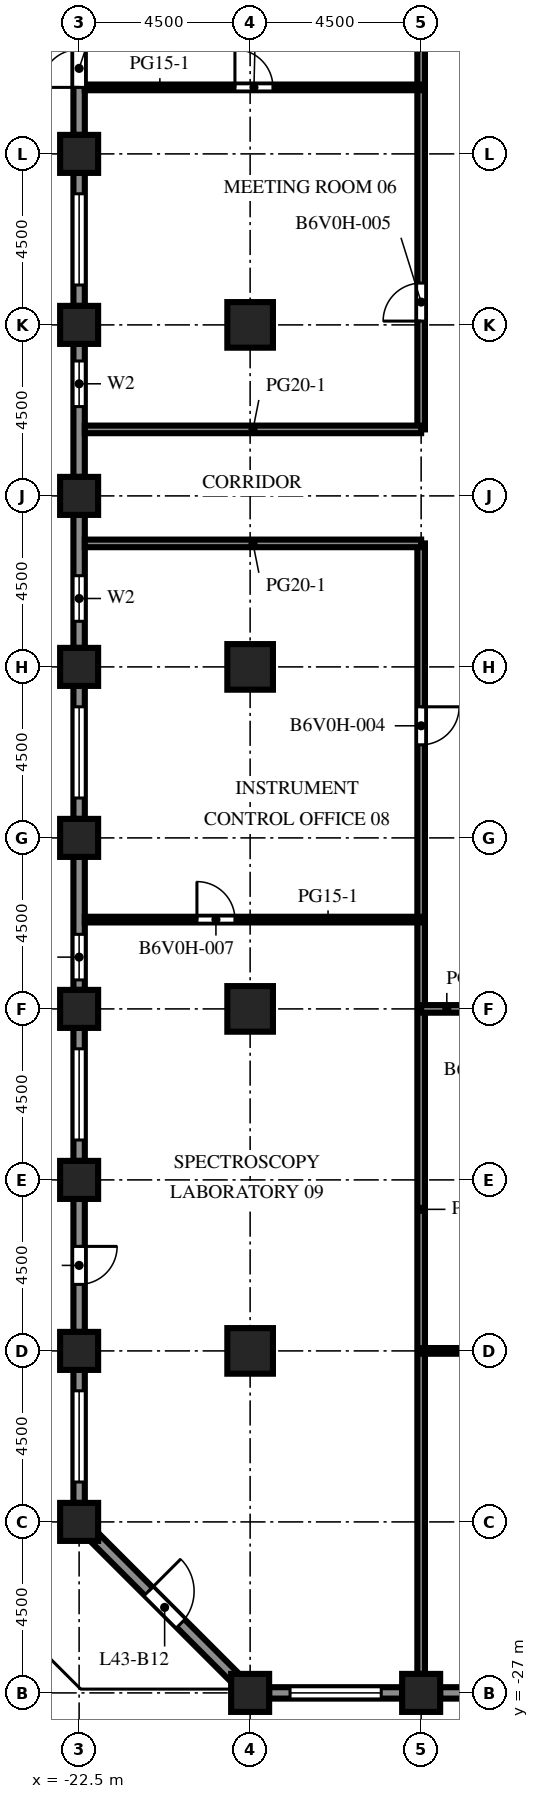
"""IFC4 building model, lengths in metres.
Left out: names, types, materials, properties, quantities, classifications, styles, units other than length and angle.
Written with IfcOpenShell. Run it as: python <this file> out.ifc"""

import sys

from ifc_helpers import new_model, si_unit, direction, frame, frame_2d, origin, origin_2d, place, context, subcontext, project, spatial, rectangle, extrude, element, fill, save


model = new_model("IFC4")
c1 = context("Model", 3, precision=1e-05, world=origin(), true_north=direction((0.0, 1.0)))
c2 = subcontext(c1, "Body", "Model", "MODEL_VIEW")
j1 = project(units=[si_unit("LENGTHUNIT", "METRE"), si_unit("PLANEANGLEUNIT", "RADIAN")], contexts=[c1])
p1 = place(None, origin())
s1 = spatial("IfcSite", under=j1, at=p1, CompositionType="ELEMENT")
p2 = place(p1, origin())
s2 = spatial("IfcBuilding", under=s1, at=p2, CompositionType="ELEMENT")
p3 = place(p2, frame((0.0, 0.0, 191.5)))
s3 = spatial("IfcBuildingStorey", under=s2, at=p3, CompositionType="ELEMENT", Elevation=191.5)
for number, where, z_axis, x_axis in (
    (1, (-22.5, -22.5, -0.45), (0.0, 0.0, 1.0), (1.0, 0.0, 0.0)),
    (2, (-22.5, -18.0, -0.45), (0.0, 0.0, 1.0), (1.0, 0.0, 0.0)),
    (3, (-22.5, -13.5, -0.45), (0.0, 0.0, 1.0), (1.0, 0.0, 0.0)),
    (4, (-22.5, -9.0, -0.45), (0.0, 0.0, 1.0), (1.0, 0.0, 0.0)),
    (5, (-22.5, -4.5, -0.45), (0.0, 0.0, 1.0), (1.0, 0.0, 0.0)),
    (6, (-22.5, 0.0, -0.45), (0.0, 0.0, 1.0), (1.0, 0.0, 0.0)),
    (7, (-22.5, 4.5, -0.45), (0.0, 0.0, 1.0), (1.0, 0.0, 0.0)),
    (8, (-22.5, 9.0, -0.45), (0.0, 0.0, 1.0), (1.0, 0.0, 0.0)),
    (9, (-22.5, 13.5, -0.45), (0.0, 0.0, 1.0), (1.0, 0.0, 0.0)),
):
    element("IfcColumn", number, at=place(p3, frame(where, z_axis=z_axis, x_axis=x_axis)), inside=s3, PredefinedType="COLUMN", context=c2, shape_type="SweptSolid", body=[
        extrude(rectangle(XDim=1.0, YDim=1.0, at=origin_2d()), origin(), (0.0, 0.0, 1.0), 4.55),
    ])
for number, where, z_axis, x_axis in (
    (10, (-18.0, -27.0, 0.0), (0.0, 0.0, 1.0), (1.0, 0.0, 0.0)),
    (11, (-13.5, -27.0, 0.0), (0.0, 0.0, 1.0), (1.0, 0.0, 0.0)),
):
    element("IfcColumn", number, at=place(p3, frame(where, z_axis=z_axis, x_axis=x_axis)), inside=s3, PredefinedType="COLUMN", context=c2, shape_type="SweptSolid", body=[
        extrude(rectangle(XDim=1.0, YDim=1.0, at=origin_2d()), origin(), (0.0, 0.0, 1.0), 4.1),
    ])
for number, where, z_axis, x_axis in (
    (12, (-18.0, -18.0, -0.45), (0.0, 0.0, 1.0), (1.0, 0.0, 0.0)),
    (13, (-18.0, -9.0, -0.45), (0.0, 0.0, 1.0), (1.0, 0.0, 0.0)),
    (14, (-18.0, 0.0, -0.45), (0.0, 0.0, 1.0), (1.0, 0.0, 0.0)),
    (15, (-18.0, 9.0, -0.45), (0.0, 0.0, 1.0), (1.0, 0.0, 0.0)),
):
    element("IfcColumn", number, at=place(p3, frame(where, z_axis=z_axis, x_axis=x_axis)), inside=s3, PredefinedType="COLUMN", context=c2, shape_type="SweptSolid", body=[
        extrude(rectangle(XDim=1.2, YDim=1.2, at=origin_2d()), origin(), (0.0, 0.0, 1.0), 4.55),
    ])
p4 = place(p3, frame((-14.0, -27.0, 0.0), z_axis=(0.0, 0.0, 1.0), x_axis=(-1.0, 0.0, 0.0)))
e16 = element("IfcWall", 16, at=p4, inside=s3, PredefinedType="SOLIDWALL", context=c2, shape_type="SweptSolid", body=[
    extrude(rectangle(XDim=3.5, YDim=0.3, at=frame_2d((1.75, 0.0))), origin(), (0.0, 0.0, 1.0), 2.85),
])
p5 = place(p4, frame((0.55, 0.0, 0.8)))
e17 = element("IfcOpeningElement", 17, at=p5, cuts=e16, PredefinedType="OPENING", context=c2, shape_type="SweptSolid", body=[
    extrude(rectangle(XDim=2.4, YDim=1.7, at=frame_2d((1.2, 0.85))), frame((0.0, 0.16, 0.0), z_axis=(0.0, -1.0, 0.0), x_axis=(1.0, 0.0, 0.0)), (0.0, 0.0, 1.0), 0.32),
])
p6 = place(p3, frame((-9.5, -27.0, 0.0), z_axis=(0.0, 0.0, 1.0), x_axis=(-1.0, 0.0, 0.0)))
e18 = element("IfcWall", 18, at=p6, inside=s3, PredefinedType="SOLIDWALL", context=c2, shape_type="SweptSolid", body=[
    extrude(rectangle(XDim=3.5, YDim=0.3, at=frame_2d((1.75, 0.0))), origin(), (0.0, 0.0, 1.0), 2.85),
])
p7 = place(p6, frame((1.25, 0.0, 0.0)))
e19 = element("IfcOpeningElement", 19, at=p7, cuts=e18, PredefinedType="OPENING", context=c2, shape_type="SweptSolid", body=[
    extrude(rectangle(XDim=1.0, YDim=2.2, at=frame_2d((0.5, 1.1))), frame((0.0, 0.16, 0.0), z_axis=(0.0, -1.0, 0.0), x_axis=(1.0, 0.0, 0.0)), (0.0, 0.0, 1.0), 0.32),
])
p8 = place(p3, frame((-22.5, 14.0, 0.0), z_axis=(0.0, 0.0, 1.0), x_axis=(0.0, 1.0, 0.0)))
e20 = element("IfcWall", 20, at=p8, inside=s3, PredefinedType="SOLIDWALL", context=c2, shape_type="SweptSolid", body=[
    extrude(rectangle(XDim=3.5, YDim=0.3, at=frame_2d((1.75, 0.0))), origin(), (0.0, 0.0, 1.0), 2.85),
])
p9 = place(p8, frame((1.25, 0.0, 0.0)))
e21 = element("IfcOpeningElement", 21, at=p9, cuts=e20, PredefinedType="OPENING", context=c2, shape_type="SweptSolid", body=[
    extrude(rectangle(XDim=1.0, YDim=2.2, at=frame_2d((0.5, 1.1))), frame((0.0, 0.16, 0.0), z_axis=(0.0, -1.0, 0.0), x_axis=(1.0, 0.0, 0.0)), (0.0, 0.0, 1.0), 0.32),
])
p10 = place(p3, frame((-22.5, 9.5, 0.0), z_axis=(0.0, 0.0, 1.0), x_axis=(0.0, 1.0, 0.0)))
e22 = element("IfcWall", 22, at=p10, inside=s3, PredefinedType="SOLIDWALL", context=c2, shape_type="SweptSolid", body=[
    extrude(rectangle(XDim=3.5, YDim=0.3, at=frame_2d((1.75, 0.0))), origin(), (0.0, 0.0, 1.0), 2.85),
])
p11 = place(p10, frame((0.55, 0.0, 0.8)))
e23 = element("IfcOpeningElement", 23, at=p11, cuts=e22, PredefinedType="OPENING", context=c2, shape_type="SweptSolid", body=[
    extrude(rectangle(XDim=2.4, YDim=1.7, at=frame_2d((1.2, 0.85))), frame((0.0, 0.16, 0.0), z_axis=(0.0, -1.0, 0.0), x_axis=(1.0, 0.0, 0.0)), (0.0, 0.0, 1.0), 0.32),
])
p12 = place(p3, frame((-22.5, 5.0, 0.0), z_axis=(0.0, 0.0, 1.0), x_axis=(0.0, 1.0, 0.0)))
e24 = element("IfcWall", 24, at=p12, inside=s3, PredefinedType="SOLIDWALL", context=c2, shape_type="SweptSolid", body=[
    extrude(rectangle(XDim=3.5, YDim=0.3, at=frame_2d((1.75, 0.0))), origin(), (0.0, 0.0, 1.0), 2.85),
])
p13 = place(p12, frame((1.85, 0.0, 0.8)))
e25 = element("IfcOpeningElement", 25, at=p13, cuts=e24, PredefinedType="OPENING", context=c2, shape_type="SweptSolid", body=[
    extrude(rectangle(XDim=1.2, YDim=1.7, at=frame_2d((0.6, 0.85))), frame((0.0, 0.16, 0.0), z_axis=(0.0, -1.0, 0.0), x_axis=(1.0, 0.0, 0.0)), (0.0, 0.0, 1.0), 0.32),
])
p14 = place(p3, frame((-22.5, 0.5, 0.0), z_axis=(0.0, 0.0, 1.0), x_axis=(0.0, 1.0, 0.0)))
e26 = element("IfcWall", 26, at=p14, inside=s3, PredefinedType="SOLIDWALL", context=c2, shape_type="SweptSolid", body=[
    extrude(rectangle(XDim=3.5, YDim=0.3, at=frame_2d((1.75, 0.0))), origin(), (0.0, 0.0, 1.0), 2.85),
])
p15 = place(p14, frame((0.7, 0.0, 0.8)))
e27 = element("IfcOpeningElement", 27, at=p15, cuts=e26, PredefinedType="OPENING", context=c2, shape_type="SweptSolid", body=[
    extrude(rectangle(XDim=1.2, YDim=1.7, at=frame_2d((0.6, 0.85))), frame((0.0, 0.16, 0.0), z_axis=(0.0, -1.0, 0.0), x_axis=(1.0, 0.0, 0.0)), (0.0, 0.0, 1.0), 0.32),
])
p16 = place(p3, frame((-22.5, -4.0, 0.0), z_axis=(0.0, 0.0, 1.0), x_axis=(0.0, 1.0, 0.0)))
e28 = element("IfcWall", 28, at=p16, inside=s3, PredefinedType="SOLIDWALL", context=c2, shape_type="SweptSolid", body=[
    extrude(rectangle(XDim=3.5, YDim=0.3, at=frame_2d((1.75, 0.0))), origin(), (0.0, 0.0, 1.0), 2.85),
])
p17 = place(p16, frame((0.55, 0.0, 0.8)))
e29 = element("IfcOpeningElement", 29, at=p17, cuts=e28, PredefinedType="OPENING", context=c2, shape_type="SweptSolid", body=[
    extrude(rectangle(XDim=2.4, YDim=1.7, at=frame_2d((1.2, 0.85))), frame((0.0, 0.16, 0.0), z_axis=(0.0, -1.0, 0.0), x_axis=(1.0, 0.0, 0.0)), (0.0, 0.0, 1.0), 0.32),
])
p18 = place(p3, frame((-22.5, -8.5, 0.0), z_axis=(0.0, 0.0, 1.0), x_axis=(0.0, 1.0, 0.0)))
e30 = element("IfcWall", 30, at=p18, inside=s3, PredefinedType="SOLIDWALL", context=c2, shape_type="SweptSolid", body=[
    extrude(rectangle(XDim=3.5, YDim=0.3, at=frame_2d((1.75, 0.0))), origin(), (0.0, 0.0, 1.0), 2.85),
])
p19 = place(p18, frame((0.262, 0.0, 0.8)))
e31 = element("IfcOpeningElement", 31, at=p19, cuts=e30, PredefinedType="OPENING", context=c2, shape_type="SweptSolid", body=[
    extrude(rectangle(XDim=1.2, YDim=1.7, at=frame_2d((0.6, 0.85))), frame((0.0, 0.16, 0.0), z_axis=(0.0, -1.0, 0.0), x_axis=(1.0, 0.0, 0.0)), (0.0, 0.0, 1.0), 0.32),
])
p20 = place(p3, frame((-22.5, -13.0, 0.0), z_axis=(0.0, 0.0, 1.0), x_axis=(0.0, 1.0, 0.0)))
e32 = element("IfcWall", 32, at=p20, inside=s3, PredefinedType="SOLIDWALL", context=c2, shape_type="SweptSolid", body=[
    extrude(rectangle(XDim=3.5, YDim=0.3, at=frame_2d((1.75, 0.0))), origin(), (0.0, 0.0, 1.0), 2.85),
])
p21 = place(p20, frame((0.55, 0.0, 0.8)))
e33 = element("IfcOpeningElement", 33, at=p21, cuts=e32, PredefinedType="OPENING", context=c2, shape_type="SweptSolid", body=[
    extrude(rectangle(XDim=2.4, YDim=1.7, at=frame_2d((1.2, 0.85))), frame((0.0, 0.16, 0.0), z_axis=(0.0, -1.0, 0.0), x_axis=(1.0, 0.0, 0.0)), (0.0, 0.0, 1.0), 0.32),
])
p22 = place(p3, frame((-22.5, -17.5, 0.0), z_axis=(0.0, 0.0, 1.0), x_axis=(0.0, 1.0, 0.0)))
e34 = element("IfcWall", 34, at=p22, inside=s3, PredefinedType="SOLIDWALL", context=c2, shape_type="SweptSolid", body=[
    extrude(rectangle(XDim=3.5, YDim=0.3, at=frame_2d((1.75, 0.0))), origin(), (0.0, 0.0, 1.0), 2.85),
])
p23 = place(p22, frame((1.25, 0.0, 0.0)))
e35 = element("IfcOpeningElement", 35, at=p23, cuts=e34, PredefinedType="OPENING", context=c2, shape_type="SweptSolid", body=[
    extrude(rectangle(XDim=1.0, YDim=2.2, at=frame_2d((0.5, 1.1))), frame((0.0, 0.16, 0.0), z_axis=(0.0, -1.0, 0.0), x_axis=(1.0, 0.0, 0.0)), (0.0, 0.0, 1.0), 0.32),
])
p24 = place(p3, frame((-22.5, -22.0, 0.0), z_axis=(0.0, 0.0, 1.0), x_axis=(0.0, 1.0, 0.0)))
e36 = element("IfcWall", 36, at=p24, inside=s3, PredefinedType="SOLIDWALL", context=c2, shape_type="SweptSolid", body=[
    extrude(rectangle(XDim=3.5, YDim=0.3, at=frame_2d((1.75, 0.0))), origin(), (0.0, 0.0, 1.0), 2.85),
])
p25 = place(p24, frame((0.55, 0.0, 0.8)))
e37 = element("IfcOpeningElement", 37, at=p25, cuts=e36, PredefinedType="OPENING", context=c2, shape_type="SweptSolid", body=[
    extrude(rectangle(XDim=2.4, YDim=1.7, at=frame_2d((1.2, 0.85))), frame((0.0, 0.16, 0.0), z_axis=(0.0, -1.0, 0.0), x_axis=(1.0, 0.0, 0.0)), (0.0, 0.0, 1.0), 0.32),
])
p26 = place(p3, frame((-18.394, -26.606, 0.0), z_axis=(0.0, 0.0, 1.0), x_axis=(-0.707106781187, 0.707106781187, 0.0)))
e38 = element("IfcWall", 38, at=p26, inside=s3, PredefinedType="SOLIDWALL", context=c2, shape_type="SweptSolid", body=[
    extrude(rectangle(XDim=5.25, YDim=0.3, at=frame_2d((2.625, 0.0))), origin(), (0.0, 0.0, 1.0), 2.85),
])
p27 = place(p26, frame((2.025, 0.0, 0.0)))
e39 = element("IfcOpeningElement", 39, at=p27, cuts=e38, PredefinedType="OPENING", context=c2, shape_type="SweptSolid", body=[
    extrude(rectangle(XDim=1.2, YDim=2.2, at=frame_2d((0.6, 1.1))), frame((0.0, 0.16, 0.0), z_axis=(0.0, -1.0, 0.0), x_axis=(1.0, 0.0, 0.0)), (0.0, 0.0, 1.0), 0.32),
])
p28 = place(p3, frame((-13.5, -26.5, 0.0), z_axis=(0.0, 0.0, 1.0), x_axis=(0.0, 1.0, 0.0)))
e40 = element("IfcWall", 40, at=p28, inside=s3, PredefinedType="PARTITIONING", context=c2, shape_type="SweptSolid", body=[
    extrude(rectangle(XDim=29.75, YDim=0.2, at=frame_2d((14.875, 0.0))), origin(), (0.0, 0.0, 1.0), 3.65),
])
p29 = place(p28, frame((24.45, 0.0, 0.0)))
e41 = element("IfcOpeningElement", 41, at=p29, cuts=e40, PredefinedType="OPENING", context=c2, shape_type="SweptSolid", body=[
    extrude(rectangle(XDim=1.0, YDim=2.1, at=frame_2d((0.5, 1.05))), frame((0.0, 0.11, 0.0), z_axis=(0.0, -1.0, 0.0), x_axis=(1.0, 0.0, 0.0)), (0.0, 0.0, 1.0), 0.22),
])
p30 = place(p3, frame((-13.5, 6.25, 0.0), z_axis=(0.0, 0.0, 1.0), x_axis=(0.0, 1.0, 0.0)))
e42 = element("IfcWall", 42, at=p30, inside=s3, PredefinedType="PARTITIONING", context=c2, shape_type="SweptSolid", body=[
    extrude(rectangle(XDim=20.25, YDim=0.2, at=frame_2d((10.125, 0.0))), origin(), (0.0, 0.0, 1.0), 3.65),
])
p31 = place(p30, frame((2.85, 0.0, 0.0)))
e43 = element("IfcOpeningElement", 43, at=p31, cuts=e42, PredefinedType="OPENING", context=c2, shape_type="SweptSolid", body=[
    extrude(rectangle(XDim=1.0, YDim=2.1, at=frame_2d((0.5, 1.05))), frame((0.0, 0.11, 0.0), z_axis=(0.0, -1.0, 0.0), x_axis=(1.0, 0.0, 0.0)), (0.0, 0.0, 1.0), 0.22),
])
p32 = place(p3, frame((-13.5, -18.0, 0.0), z_axis=(0.0, 0.0, 1.0), x_axis=(1.0, 0.0, 0.0)))
e44 = element("IfcWall", 44, at=p32, inside=s3, PredefinedType="PARTITIONING", context=c2, shape_type="SweptSolid", body=[
    extrude(rectangle(XDim=3.9, YDim=0.15, at=frame_2d((1.95, 0.0))), origin(), (0.0, 0.0, 1.0), 3.65),
])
p33 = place(p3, frame((-10.5, -9.0, 0.0), z_axis=(0.0, 0.0, 1.0), x_axis=(-1.0, 0.0, 0.0)))
e45 = element("IfcWall", 45, at=p33, inside=s3, PredefinedType="PARTITIONING", context=c2, shape_type="SweptSolid", body=[
    extrude(rectangle(XDim=3.0, YDim=0.2, at=frame_2d((1.5, 0.0))), origin(), (0.0, 0.0, 1.0), 3.65),
])
p34 = place(p33, frame((0.65, 0.0, 0.0)))
e46 = element("IfcOpeningElement", 46, at=p34, cuts=e45, PredefinedType="OPENING", context=c2, shape_type="SweptSolid", body=[
    extrude(rectangle(XDim=1.0, YDim=2.1, at=frame_2d((0.5, 1.05))), frame((0.0, 0.11, 0.0), z_axis=(0.0, -1.0, 0.0), x_axis=(1.0, 0.0, 0.0)), (0.0, 0.0, 1.0), 0.22),
])
p35 = place(p3, frame((-13.5, -6.65, 0.0), z_axis=(0.0, 0.0, 1.0), x_axis=(-1.0, 0.0, 0.0)))
e47 = element("IfcWall", 47, at=p35, inside=s3, PredefinedType="PARTITIONING", context=c2, shape_type="SweptSolid", body=[
    extrude(rectangle(XDim=8.85, YDim=0.15, at=frame_2d((4.425, 0.0))), origin(), (0.0, 0.0, 1.0), 3.65),
])
p36 = place(p35, frame((4.9, 0.0, 0.0)))
e48 = element("IfcOpeningElement", 48, at=p36, cuts=e47, PredefinedType="OPENING", context=c2, shape_type="SweptSolid", body=[
    extrude(rectangle(XDim=1.0, YDim=2.1, at=frame_2d((0.5, 1.05))), frame((0.0, 0.085, 0.0), z_axis=(0.0, -1.0, 0.0), x_axis=(1.0, 0.0, 0.0)), (0.0, 0.0, 1.0), 0.17),
])
for number, where, z_axis, x_axis in (
    (49, (-22.35, 3.25, 0.0), (0.0, 0.0, 1.0), (1.0, 0.0, 0.0)),
    (50, (-22.35, 6.25, 0.0), (0.0, 0.0, 1.0), (1.0, 0.0, 0.0)),
):
    element("IfcWall", number, at=place(p3, frame(where, z_axis=z_axis, x_axis=x_axis)), inside=s3, PredefinedType="PARTITIONING", context=c2, shape_type="SweptSolid", body=[
        extrude(rectangle(XDim=8.85, YDim=0.2, at=frame_2d((4.425, 0.0))), origin(), (0.0, 0.0, 1.0), 3.65),
    ])
p37 = place(p3, frame((-22.35, 15.25, 0.0), z_axis=(0.0, 0.0, 1.0), x_axis=(1.0, 0.0, 0.0)))
e51 = element("IfcWall", 51, at=p37, inside=s3, PredefinedType="PARTITIONING", context=c2, shape_type="SweptSolid", body=[
    extrude(rectangle(XDim=8.85, YDim=0.15, at=frame_2d((4.425, 0.0))), origin(), (0.0, 0.0, 1.0), 3.65),
])
p38 = place(p37, frame((3.95, 0.0, 0.0)))
e52 = element("IfcOpeningElement", 52, at=p38, cuts=e51, PredefinedType="OPENING", context=c2, shape_type="SweptSolid", body=[
    extrude(rectangle(XDim=1.0, YDim=2.1, at=frame_2d((0.5, 1.05))), frame((0.0, 0.085, 0.0), z_axis=(0.0, -1.0, 0.0), x_axis=(1.0, 0.0, 0.0)), (0.0, 0.0, 1.0), 0.17),
])
p39 = place(p5, origin())
e53 = element("IfcWindow", 53, at=p39, inside=s3, PartitioningType="SINGLE_PANEL", PredefinedType="WINDOW", context=c2, shape_type="SweptSolid", body=[
    extrude(rectangle(XDim=2.4, YDim=1.7, at=frame_2d((1.2, 0.85))), frame((0.0, 0.03, 0.0), z_axis=(0.0, -1.0, 0.0), x_axis=(1.0, 0.0, 0.0)), (0.0, 0.0, 1.0), 0.06),
])
fill(e17, e53)
p40 = place(p9, origin())
e54 = element("IfcDoor", 54, at=p40, inside=s3, OperationType="SINGLE_SWING_LEFT", PredefinedType="DOOR", context=c2, shape_type="SweptSolid", body=[
    extrude(rectangle(XDim=1.0, YDim=2.2, at=frame_2d((0.5, 1.1))), frame((0.0, 0.025, 0.0), z_axis=(0.0, -1.0, 0.0), x_axis=(1.0, 0.0, 0.0)), (0.0, 0.0, 1.0), 0.05),
])
fill(e21, e54)
p41 = place(p11, origin())
e55 = element("IfcWindow", 55, at=p41, inside=s3, PartitioningType="SINGLE_PANEL", PredefinedType="WINDOW", context=c2, shape_type="SweptSolid", body=[
    extrude(rectangle(XDim=2.4, YDim=1.7, at=frame_2d((1.2, 0.85))), frame((0.0, 0.03, 0.0), z_axis=(0.0, -1.0, 0.0), x_axis=(1.0, 0.0, 0.0)), (0.0, 0.0, 1.0), 0.06),
])
fill(e23, e55)
p42 = place(p13, origin())
e56 = element("IfcWindow", 56, at=p42, inside=s3, PartitioningType="SINGLE_PANEL", PredefinedType="WINDOW", context=c2, shape_type="SweptSolid", body=[
    extrude(rectangle(XDim=1.2, YDim=1.7, at=frame_2d((0.6, 0.85))), frame((0.0, 0.03, 0.0), z_axis=(0.0, -1.0, 0.0), x_axis=(1.0, 0.0, 0.0)), (0.0, 0.0, 1.0), 0.06),
])
fill(e25, e56)
p43 = place(p15, origin())
e57 = element("IfcWindow", 57, at=p43, inside=s3, PartitioningType="SINGLE_PANEL", PredefinedType="WINDOW", context=c2, shape_type="SweptSolid", body=[
    extrude(rectangle(XDim=1.2, YDim=1.7, at=frame_2d((0.6, 0.85))), frame((0.0, 0.03, 0.0), z_axis=(0.0, -1.0, 0.0), x_axis=(1.0, 0.0, 0.0)), (0.0, 0.0, 1.0), 0.06),
])
fill(e27, e57)
p44 = place(p17, origin())
e58 = element("IfcWindow", 58, at=p44, inside=s3, PartitioningType="SINGLE_PANEL", PredefinedType="WINDOW", context=c2, shape_type="SweptSolid", body=[
    extrude(rectangle(XDim=2.4, YDim=1.7, at=frame_2d((1.2, 0.85))), frame((0.0, 0.03, 0.0), z_axis=(0.0, -1.0, 0.0), x_axis=(1.0, 0.0, 0.0)), (0.0, 0.0, 1.0), 0.06),
])
fill(e29, e58)
p45 = place(p19, origin())
e59 = element("IfcWindow", 59, at=p45, inside=s3, PartitioningType="SINGLE_PANEL", PredefinedType="WINDOW", context=c2, shape_type="SweptSolid", body=[
    extrude(rectangle(XDim=1.2, YDim=1.7, at=frame_2d((0.6, 0.85))), frame((0.0, 0.03, 0.0), z_axis=(0.0, -1.0, 0.0), x_axis=(1.0, 0.0, 0.0)), (0.0, 0.0, 1.0), 0.06),
])
fill(e31, e59)
p46 = place(p21, origin())
e60 = element("IfcWindow", 60, at=p46, inside=s3, PartitioningType="SINGLE_PANEL", PredefinedType="WINDOW", context=c2, shape_type="SweptSolid", body=[
    extrude(rectangle(XDim=2.4, YDim=1.7, at=frame_2d((1.2, 0.85))), frame((0.0, 0.03, 0.0), z_axis=(0.0, -1.0, 0.0), x_axis=(1.0, 0.0, 0.0)), (0.0, 0.0, 1.0), 0.06),
])
fill(e33, e60)
p47 = place(p23, origin())
e61 = element("IfcDoor", 61, at=p47, inside=s3, OperationType="SINGLE_SWING_RIGHT", PredefinedType="DOOR", context=c2, shape_type="SweptSolid", body=[
    extrude(rectangle(XDim=1.0, YDim=2.2, at=frame_2d((0.5, 1.1))), frame((0.0, 0.025, 0.0), z_axis=(0.0, -1.0, 0.0), x_axis=(1.0, 0.0, 0.0)), (0.0, 0.0, 1.0), 0.05),
])
fill(e35, e61)
p48 = place(p25, origin())
e62 = element("IfcWindow", 62, at=p48, inside=s3, PartitioningType="SINGLE_PANEL", PredefinedType="WINDOW", context=c2, shape_type="SweptSolid", body=[
    extrude(rectangle(XDim=2.4, YDim=1.7, at=frame_2d((1.2, 0.85))), frame((0.0, 0.03, 0.0), z_axis=(0.0, -1.0, 0.0), x_axis=(1.0, 0.0, 0.0)), (0.0, 0.0, 1.0), 0.06),
])
fill(e37, e62)
p49 = place(p27, origin())
e63 = element("IfcDoor", 63, at=p49, inside=s3, OperationType="SINGLE_SWING_RIGHT", PredefinedType="DOOR", context=c2, shape_type="SweptSolid", body=[
    extrude(rectangle(XDim=1.2, YDim=2.2, at=frame_2d((0.6, 1.1))), frame((0.0, 0.025, 0.0), z_axis=(0.0, -1.0, 0.0), x_axis=(1.0, 0.0, 0.0)), (0.0, 0.0, 1.0), 0.05),
])
fill(e39, e63)
p50 = place(p29, origin())
e64 = element("IfcDoor", 64, at=p50, inside=s3, OperationType="SINGLE_SWING_RIGHT", PredefinedType="DOOR", context=c2, shape_type="SweptSolid", body=[
    extrude(rectangle(XDim=1.0, YDim=2.1, at=frame_2d((0.5, 1.05))), frame((0.0, 0.025, 0.0), z_axis=(0.0, -1.0, 0.0), x_axis=(1.0, 0.0, 0.0)), (0.0, 0.0, 1.0), 0.05),
])
fill(e41, e64)
p51 = place(p31, origin())
e65 = element("IfcDoor", 65, at=p51, inside=s3, OperationType="SINGLE_SWING_LEFT", PredefinedType="DOOR", context=c2, shape_type="SweptSolid", body=[
    extrude(rectangle(XDim=1.0, YDim=2.1, at=frame_2d((0.5, 1.05))), frame((0.0, 0.025, 0.0), z_axis=(0.0, -1.0, 0.0), x_axis=(1.0, 0.0, 0.0)), (0.0, 0.0, 1.0), 0.05),
])
fill(e43, e65)
p52 = place(p36, origin())
e66 = element("IfcDoor", 66, at=p52, inside=s3, OperationType="SINGLE_SWING_RIGHT", PredefinedType="DOOR", context=c2, shape_type="SweptSolid", body=[
    extrude(rectangle(XDim=1.0, YDim=2.1, at=frame_2d((0.5, 1.05))), frame((0.0, 0.025, 0.0), z_axis=(0.0, -1.0, 0.0), x_axis=(1.0, 0.0, 0.0)), (0.0, 0.0, 1.0), 0.05),
])
fill(e48, e66)
p53 = place(p38, origin())
e67 = element("IfcDoor", 67, at=p53, inside=s3, OperationType="SINGLE_SWING_LEFT", PredefinedType="DOOR", context=c2, shape_type="SweptSolid", body=[
    extrude(rectangle(XDim=1.0, YDim=2.1, at=frame_2d((0.5, 1.05))), frame((0.0, 0.025, 0.0), z_axis=(0.0, -1.0, 0.0), x_axis=(1.0, 0.0, 0.0)), (0.0, 0.0, 1.0), 0.05),
])
fill(e52, e67)
save(model, sys.argv[1])
